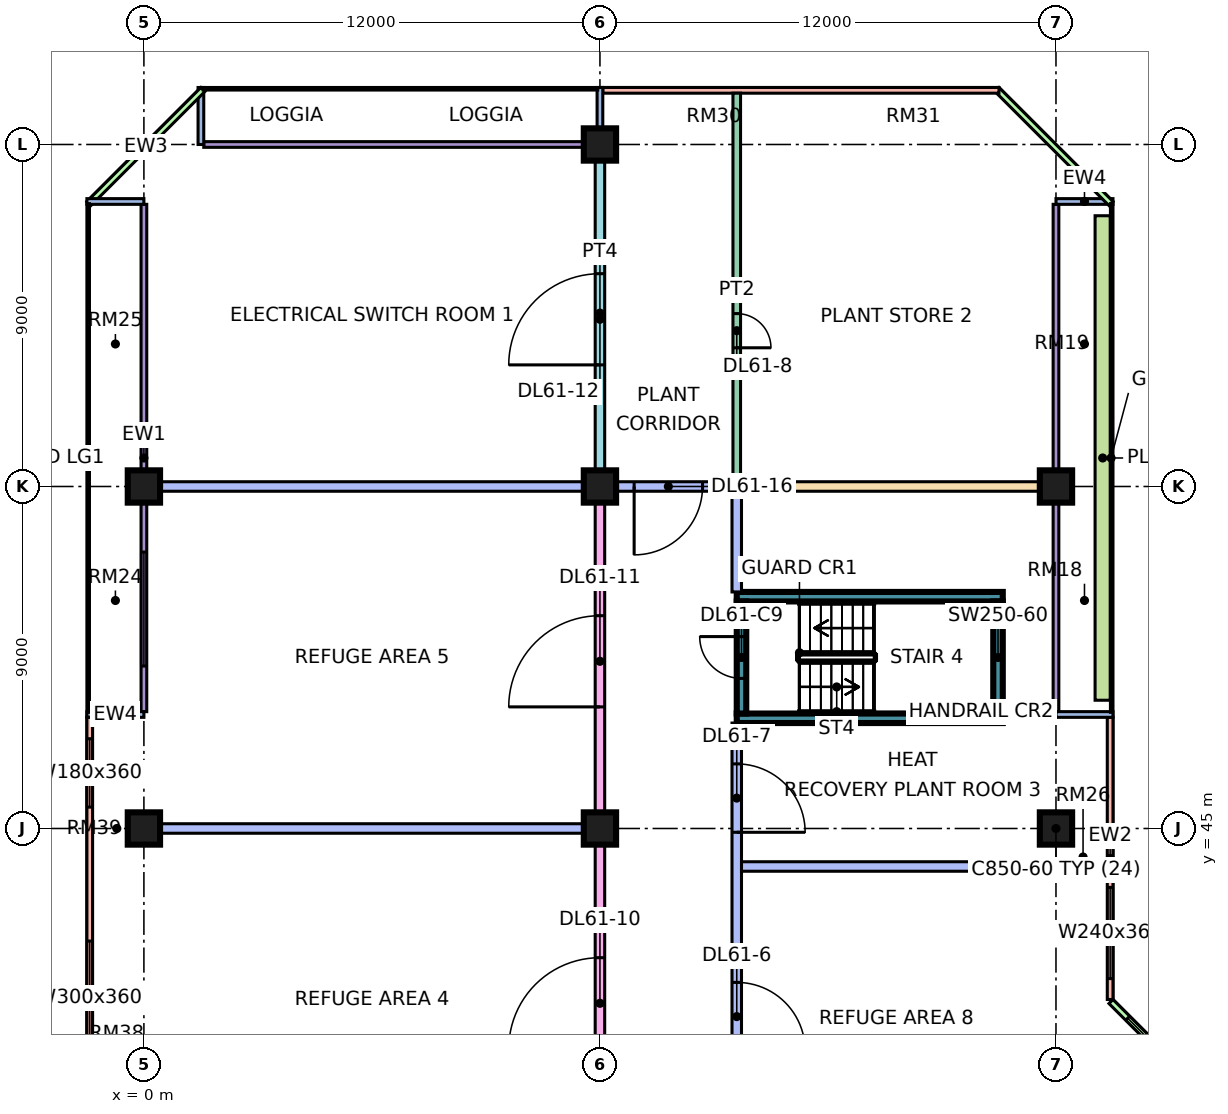
"""IFC4 building model, lengths in metres.
Left out: names, types, materials, properties, quantities, classifications, styles, units other than length and angle.
Written with IfcOpenShell. Run it as: python <this file> out.ifc"""

import sys

from ifc_helpers import new_model, si_unit, direction, frame, frame_2d, origin, origin_2d, place, context, subcontext, project, spatial, rectangle, extrude, element, fill, save


model = new_model("IFC4")
c1 = context("Model", 3, precision=1e-05, world=origin(), true_north=direction((0.0, 1.0)))
c2 = subcontext(c1, "Body", "Model", "MODEL_VIEW")
j1 = project(units=[si_unit("LENGTHUNIT", "METRE"), si_unit("PLANEANGLEUNIT", "RADIAN")], contexts=[c1])
p1 = place(None, origin())
s1 = spatial("IfcSite", under=j1, at=p1, CompositionType="ELEMENT")
p2 = place(p1, origin())
s2 = spatial("IfcBuilding", under=s1, at=p2, CompositionType="ELEMENT")
p3 = place(p2, frame((0.0, 0.0, 256.65)))
s3 = spatial("IfcBuildingStorey", under=s2, at=p3, CompositionType="ELEMENT", Elevation=256.65)
p4 = place(p3, frame((0.0, 45.0, 0.0), z_axis=(0.0, 0.0, 1.0), x_axis=(1.0, 0.0, 0.0)))
e1 = element("IfcColumn", 1, at=p4, inside=s3, PredefinedType="COLUMN", context=c2, shape_type="SweptSolid", body=[
    extrude(rectangle(XDim=0.85, YDim=0.85, at=origin_2d()), origin(), (0.0, 0.0, 1.0), 5.5),
])
for number, where, z_axis, x_axis in (
    (2, (0.0, 54.0, 0.0), (0.0, 0.0, 1.0), (1.0, 0.0, 0.0)),
    (3, (12.0, 45.0, 0.0), (0.0, 0.0, 1.0), (1.0, 0.0, 0.0)),
    (4, (12.0, 54.0, 0.0), (0.0, 0.0, 1.0), (1.0, 0.0, 0.0)),
    (5, (12.0, 63.0, 0.0), (0.0, 0.0, 1.0), (1.0, 0.0, 0.0)),
    (6, (24.0, 45.0, 0.0), (0.0, 0.0, 1.0), (1.0, 0.0, 0.0)),
    (7, (24.0, 54.0, 0.0), (0.0, 0.0, 1.0), (1.0, 0.0, 0.0)),
):
    element("IfcColumn", number, at=place(p3, frame(where, z_axis=z_axis, x_axis=x_axis)), inside=s3, PredefinedType="COLUMN", context=c2, shape_type="SweptSolid", body=[
        extrude(rectangle(XDim=0.85, YDim=0.85, at=origin_2d()), origin(), (0.0, 0.0, 1.0), 5.5),
    ])
for number, where, z_axis, x_axis in (
    (8, (15.6, 47.9, 0.0), (0.0, 0.0, 1.0), (1.0, 0.0, 0.0)),
    (9, (15.6, 51.1, 0.0), (0.0, 0.0, 1.0), (1.0, 0.0, 0.0)),
):
    element("IfcWall", number, at=place(p3, frame(where, z_axis=z_axis, x_axis=x_axis)), inside=s3, PredefinedType="SHEAR", context=c2, shape_type="SweptSolid", body=[
        extrude(rectangle(XDim=7.0, YDim=0.25, at=frame_2d((3.5, 0.0))), origin(), (0.0, 0.0, 1.0), 5.5),
    ])
p5 = place(p3, frame((15.725, 48.025, 0.0), z_axis=(0.0, 0.0, 1.0), x_axis=(0.0, 1.0, 0.0)))
e10 = element("IfcWall", 10, at=p5, inside=s3, PredefinedType="SHEAR", context=c2, shape_type="SweptSolid", body=[
    extrude(rectangle(XDim=2.95, YDim=0.25, at=frame_2d((1.475, 0.0))), origin(), (0.0, 0.0, 1.0), 5.5),
])
p6 = place(p5, frame((0.925, 0.0, 0.0)))
e11 = element("IfcOpeningElement", 11, at=p6, cuts=e10, PredefinedType="OPENING", context=c2, shape_type="SweptSolid", body=[
    extrude(rectangle(XDim=1.1, YDim=2.2, at=frame_2d((0.55, 1.1))), frame((0.0, 0.135, 0.0), z_axis=(0.0, -1.0, 0.0), x_axis=(1.0, 0.0, 0.0)), (0.0, 0.0, 1.0), 0.27),
])
p7 = place(p3, frame((22.475, 48.025, 0.0), z_axis=(0.0, 0.0, 1.0), x_axis=(0.0, 1.0, 0.0)))
e12 = element("IfcWall", 12, at=p7, inside=s3, PredefinedType="SHEAR", context=c2, shape_type="SweptSolid", body=[
    extrude(rectangle(XDim=2.95, YDim=0.25, at=frame_2d((1.475, 0.0))), origin(), (0.0, 0.0, 1.0), 5.5),
])
p8 = place(p3, frame((28.447, 37.447, 0.0), z_axis=(0.0, 0.0, 1.0), x_axis=(-0.707106781187, 0.707106781187, 0.0)))
e13 = element("IfcWall", 13, at=p8, inside=s3, PredefinedType="SOLIDWALL", context=c2, shape_type="SweptSolid", body=[
    extrude(rectangle(XDim=4.243, YDim=0.15, at=frame_2d((2.121, 0.0))), origin(), (0.0, 0.0, 1.0), 5.05),
])
p9 = place(p8, frame((0.621, 0.0, 0.45)))
e14 = element("IfcOpeningElement", 14, at=p9, cuts=e13, PredefinedType="OPENING", context=c2, shape_type="SweptSolid", body=[
    extrude(rectangle(XDim=3.0, YDim=3.6, at=frame_2d((1.5, 1.8))), frame((0.0, 0.085, 0.0), z_axis=(0.0, -1.0, 0.0), x_axis=(1.0, 0.0, 0.0)), (0.0, 0.0, 1.0), 0.17),
])
p10 = place(p3, frame((25.425, 40.5, 0.0), z_axis=(0.0, 0.0, 1.0), x_axis=(0.0, 1.0, 0.0)))
e15 = element("IfcWall", 15, at=p10, inside=s3, PredefinedType="SOLIDWALL", context=c2, shape_type="SweptSolid", body=[
    extrude(rectangle(XDim=7.425, YDim=0.15, at=frame_2d((3.712, 0.0))), origin(), (0.0, 0.0, 1.0), 5.05),
])
p11 = place(p10, frame((0.55, 0.0, 0.45)))
e16 = element("IfcOpeningElement", 16, at=p11, cuts=e15, PredefinedType="OPENING", context=c2, shape_type="SweptSolid", body=[
    extrude(rectangle(XDim=2.4, YDim=3.6, at=frame_2d((1.2, 1.8))), frame((0.0, 0.085, 0.0), z_axis=(0.0, -1.0, 0.0), x_axis=(1.0, 0.0, 0.0)), (0.0, 0.0, 1.0), 0.17),
])
p12 = place(p3, frame((24.0, 48.075, 0.0), z_axis=(0.0, 0.0, 1.0), x_axis=(0.0, 1.0, 0.0)))
e17 = element("IfcWall", 17, at=p12, inside=s3, PredefinedType="SOLIDWALL", context=c2, shape_type="SweptSolid", body=[
    extrude(rectangle(XDim=13.35, YDim=0.15, at=frame_2d((6.675, 0.0))), origin(), (0.0, 0.0, 1.0), 5.05),
])
for number, where, z_axis, x_axis in (
    (18, (25.5, 48.0, 0.0), (0.0, 0.0, 1.0), (-1.0, 0.0, 0.0)),
    (19, (25.5, 61.5, 0.0), (0.0, 0.0, 1.0), (-1.0, 0.0, 0.0)),
):
    element("IfcWall", number, at=place(p3, frame(where, z_axis=z_axis, x_axis=x_axis)), inside=s3, PredefinedType="SOLIDWALL", context=c2, shape_type="SweptSolid", body=[
        extrude(rectangle(XDim=1.5, YDim=0.15, at=frame_2d((0.75, 0.0))), origin(), (0.0, 0.0, 1.0), 5.05),
    ])
p13 = place(p3, frame((25.447, 61.447, 0.0), z_axis=(0.0, 0.0, 1.0), x_axis=(-0.707106781187, 0.707106781187, 0.0)))
e20 = element("IfcWall", 20, at=p13, inside=s3, PredefinedType="SOLIDWALL", context=c2, shape_type="SweptSolid", body=[
    extrude(rectangle(XDim=4.243, YDim=0.15, at=frame_2d((2.121, 0.0))), origin(), (0.0, 0.0, 1.0), 5.05),
])
p14 = place(p3, frame((22.5, 64.425, 0.0), z_axis=(0.0, 0.0, 1.0), x_axis=(-1.0, 0.0, 0.0)))
e21 = element("IfcWall", 21, at=p14, inside=s3, PredefinedType="SOLIDWALL", context=c2, shape_type="SweptSolid", body=[
    extrude(rectangle(XDim=10.425, YDim=0.15, at=frame_2d((5.212, 0.0))), origin(), (0.0, 0.0, 1.0), 5.05),
])
p15 = place(p3, frame((11.925, 63.0, 0.0), z_axis=(0.0, 0.0, 1.0), x_axis=(-1.0, 0.0, 0.0)))
e22 = element("IfcWall", 22, at=p15, inside=s3, PredefinedType="SOLIDWALL", context=c2, shape_type="SweptSolid", body=[
    extrude(rectangle(XDim=10.35, YDim=0.15, at=frame_2d((5.175, 0.0))), origin(), (0.0, 0.0, 1.0), 5.05),
])
for number, where, z_axis, x_axis in (
    (23, (12.0, 64.5, 0.0), (0.0, 0.0, 1.0), (0.0, -1.0, 0.0)),
    (24, (1.5, 64.5, 0.0), (0.0, 0.0, 1.0), (0.0, -1.0, 0.0)),
):
    element("IfcWall", number, at=place(p3, frame(where, z_axis=z_axis, x_axis=x_axis)), inside=s3, PredefinedType="SOLIDWALL", context=c2, shape_type="SweptSolid", body=[
        extrude(rectangle(XDim=1.5, YDim=0.15, at=frame_2d((0.75, 0.0))), origin(), (0.0, 0.0, 1.0), 5.05),
    ])
p16 = place(p3, frame((1.553, 64.447, 0.0), z_axis=(0.0, 0.0, 1.0), x_axis=(-0.707106781187, -0.707106781187, 0.0)))
e25 = element("IfcWall", 25, at=p16, inside=s3, PredefinedType="SOLIDWALL", context=c2, shape_type="SweptSolid", body=[
    extrude(rectangle(XDim=4.243, YDim=0.15, at=frame_2d((2.121, 0.0))), origin(), (0.0, 0.0, 1.0), 5.05),
])
p17 = place(p3, frame((0.0, 61.425, 0.0), z_axis=(0.0, 0.0, 1.0), x_axis=(0.0, -1.0, 0.0)))
e26 = element("IfcWall", 26, at=p17, inside=s3, PredefinedType="SOLIDWALL", context=c2, shape_type="SweptSolid", body=[
    extrude(rectangle(XDim=13.35, YDim=0.15, at=frame_2d((6.675, 0.0))), origin(), (0.0, 0.0, 1.0), 5.05),
])
p18 = place(p17, frame((9.15, 0.0, 0.45)))
e27 = element("IfcOpeningElement", 27, at=p18, cuts=e26, PredefinedType="OPENING", context=c2, shape_type="SweptSolid", body=[
    extrude(rectangle(XDim=3.0, YDim=3.6, at=frame_2d((1.5, 1.8))), frame((0.0, 0.085, 0.0), z_axis=(0.0, -1.0, 0.0), x_axis=(1.0, 0.0, 0.0)), (0.0, 0.0, 1.0), 0.17),
])
for number, where, z_axis, x_axis in (
    (28, (-1.5, 61.5, 0.0), (0.0, 0.0, 1.0), (1.0, 0.0, 0.0)),
    (29, (-1.5, 48.0, 0.0), (0.0, 0.0, 1.0), (1.0, 0.0, 0.0)),
):
    element("IfcWall", number, at=place(p3, frame(where, z_axis=z_axis, x_axis=x_axis)), inside=s3, PredefinedType="SOLIDWALL", context=c2, shape_type="SweptSolid", body=[
        extrude(rectangle(XDim=1.5, YDim=0.15, at=frame_2d((0.75, 0.0))), origin(), (0.0, 0.0, 1.0), 5.05),
    ])
p19 = place(p3, frame((-1.425, 47.925, 0.0), z_axis=(0.0, 0.0, 1.0), x_axis=(0.0, -1.0, 0.0)))
e30 = element("IfcWall", 30, at=p19, inside=s3, PredefinedType="SOLIDWALL", context=c2, shape_type="SweptSolid", body=[
    extrude(rectangle(XDim=11.85, YDim=0.15, at=frame_2d((5.925, 0.0))), origin(), (0.0, 0.0, 1.0), 5.05),
])
p20 = place(p19, frame((0.562, 0.0, 0.45)))
e31 = element("IfcOpeningElement", 31, at=p20, cuts=e30, PredefinedType="OPENING", context=c2, shape_type="SweptSolid", body=[
    extrude(rectangle(XDim=1.8, YDim=3.6, at=frame_2d((0.9, 1.8))), frame((0.0, 0.085, 0.0), z_axis=(0.0, -1.0, 0.0), x_axis=(1.0, 0.0, 0.0)), (0.0, 0.0, 1.0), 0.17),
])
p21 = place(p19, frame((5.887, 0.0, 0.45)))
e32 = element("IfcOpeningElement", 32, at=p21, cuts=e30, PredefinedType="OPENING", context=c2, shape_type="SweptSolid", body=[
    extrude(rectangle(XDim=3.0, YDim=3.6, at=frame_2d((1.5, 1.8))), frame((0.0, 0.085, 0.0), z_axis=(0.0, -1.0, 0.0), x_axis=(1.0, 0.0, 0.0)), (0.0, 0.0, 1.0), 0.17),
])
p22 = place(p3, frame((25.229, 48.375, 0.0), z_axis=(0.0, 0.0, 1.0), x_axis=(0.0, 1.0, 0.0)))
e33 = element("IfcWall", 33, at=p22, inside=s3, PredefinedType="SOLIDWALL", context=c2, shape_type="SweptSolid", body=[
    extrude(rectangle(XDim=12.75, YDim=0.4, at=frame_2d((6.375, 0.0))), origin(), (0.0, 0.0, 1.0), 0.7),
])
e34 = element("IfcWall", 34, at=p4, inside=s3, PredefinedType="PARTITIONING", context=c2, shape_type="SweptSolid", body=[
    extrude(rectangle(XDim=11.875, YDim=0.25, at=frame_2d((5.938, 0.0))), origin(), (0.0, 0.0, 1.0), 5.05),
])
p23 = place(p3, frame((0.074, 54.0, 0.0), z_axis=(0.0, 0.0, 1.0), x_axis=(1.0, 0.0, 0.0)))
e35 = element("IfcWall", 35, at=p23, inside=s3, PredefinedType="PARTITIONING", context=c2, shape_type="SweptSolid", body=[
    extrude(rectangle(XDim=15.526, YDim=0.25, at=frame_2d((7.763, 0.0))), origin(), (0.0, 0.0, 1.0), 5.05),
])
p24 = place(p23, frame((12.826, 0.0, 0.0)))
e36 = element("IfcOpeningElement", 36, at=p24, cuts=e35, PredefinedType="OPENING", context=c2, shape_type="SweptSolid", body=[
    extrude(rectangle(XDim=1.8, YDim=2.1, at=frame_2d((0.9, 1.05))), frame((0.0, 0.135, 0.0), z_axis=(0.0, -1.0, 0.0), x_axis=(1.0, 0.0, 0.0)), (0.0, 0.0, 1.0), 0.27),
])
p25 = place(p3, frame((12.0, 22.875, 0.0), z_axis=(0.0, 0.0, 1.0), x_axis=(0.0, 1.0, 0.0)))
e37 = element("IfcWall", 37, at=p25, inside=s3, PredefinedType="PARTITIONING", context=c2, shape_type="SweptSolid", body=[
    extrude(rectangle(XDim=31.0, YDim=0.25, at=frame_2d((15.5, 0.0))), origin(), (0.0, 0.0, 1.0), 2.45),
])
p26 = place(p25, frame((5.825, 0.0, 0.0)))
e38 = element("IfcOpeningElement", 38, at=p26, cuts=e37, PredefinedType="OPENING", context=c2, shape_type="SweptSolid", body=[
    extrude(rectangle(XDim=2.4, YDim=2.1, at=frame_2d((1.2, 1.05))), frame((0.0, 0.135, 0.0), z_axis=(0.0, -1.0, 0.0), x_axis=(1.0, 0.0, 0.0)), (0.0, 0.0, 1.0), 0.27),
])
p27 = place(p25, frame((16.325, 0.0, 0.0)))
e39 = element("IfcOpeningElement", 39, at=p27, cuts=e37, PredefinedType="OPENING", context=c2, shape_type="SweptSolid", body=[
    extrude(rectangle(XDim=2.4, YDim=2.1, at=frame_2d((1.2, 1.05))), frame((0.0, 0.135, 0.0), z_axis=(0.0, -1.0, 0.0), x_axis=(1.0, 0.0, 0.0)), (0.0, 0.0, 1.0), 0.27),
])
p28 = place(p25, frame((25.325, 0.0, 0.0)))
e40 = element("IfcOpeningElement", 40, at=p28, cuts=e37, PredefinedType="OPENING", context=c2, shape_type="SweptSolid", body=[
    extrude(rectangle(XDim=2.4, YDim=2.1, at=frame_2d((1.2, 1.05))), frame((0.0, 0.135, 0.0), z_axis=(0.0, -1.0, 0.0), x_axis=(1.0, 0.0, 0.0)), (0.0, 0.0, 1.0), 0.27),
])
p29 = place(p3, frame((12.0, 54.125, 0.0), z_axis=(0.0, 0.0, 1.0), x_axis=(0.0, 1.0, 0.0)))
e41 = element("IfcWall", 41, at=p29, inside=s3, PredefinedType="PARTITIONING", context=c2, shape_type="SweptSolid", body=[
    extrude(rectangle(XDim=8.875, YDim=0.25, at=frame_2d((4.438, 0.0))), origin(), (0.0, 0.0, 1.0), 2.45),
])
p30 = place(p29, frame((3.075, 0.0, 0.0)))
e42 = element("IfcOpeningElement", 42, at=p30, cuts=e41, PredefinedType="OPENING", context=c2, shape_type="SweptSolid", body=[
    extrude(rectangle(XDim=2.4, YDim=2.1, at=frame_2d((1.2, 1.05))), frame((0.0, 0.135, 0.0), z_axis=(0.0, -1.0, 0.0), x_axis=(1.0, 0.0, 0.0)), (0.0, 0.0, 1.0), 0.27),
])
p31 = place(p3, frame((15.6, 20.0, 0.0), z_axis=(0.0, 0.0, 1.0), x_axis=(0.0, 1.0, 0.0)))
e43 = element("IfcWall", 43, at=p31, inside=s3, PredefinedType="PARTITIONING", context=c2, shape_type="SweptSolid", body=[
    extrude(rectangle(XDim=27.775, YDim=0.25, at=frame_2d((13.887, 0.0))), origin(), (0.0, 0.0, 1.0), 5.05),
])
p32 = place(p31, frame((19.15, 0.0, 0.0)))
e44 = element("IfcOpeningElement", 44, at=p32, cuts=e43, PredefinedType="OPENING", context=c2, shape_type="SweptSolid", body=[
    extrude(rectangle(XDim=1.8, YDim=2.1, at=frame_2d((0.9, 1.05))), frame((0.0, 0.135, 0.0), z_axis=(0.0, -1.0, 0.0), x_axis=(1.0, 0.0, 0.0)), (0.0, 0.0, 1.0), 0.27),
])
p33 = place(p31, frame((24.9, 0.0, 0.0)))
e45 = element("IfcOpeningElement", 45, at=p33, cuts=e43, PredefinedType="OPENING", context=c2, shape_type="SweptSolid", body=[
    extrude(rectangle(XDim=1.8, YDim=2.1, at=frame_2d((0.9, 1.05))), frame((0.0, 0.135, 0.0), z_axis=(0.0, -1.0, 0.0), x_axis=(1.0, 0.0, 0.0)), (0.0, 0.0, 1.0), 0.27),
])
p34 = place(p31, frame((14.65, 0.0, 0.0)))
e46 = element("IfcOpeningElement", 46, at=p34, cuts=e43, PredefinedType="OPENING", context=c2, shape_type="SweptSolid", body=[
    extrude(rectangle(XDim=0.9, YDim=2.1, at=frame_2d((0.45, 1.05))), frame((0.0, 0.135, 0.0), z_axis=(0.0, -1.0, 0.0), x_axis=(1.0, 0.0, 0.0)), (0.0, 0.0, 1.0), 0.27),
])
p35 = place(p31, frame((11.4, 0.0, 0.0)))
e47 = element("IfcOpeningElement", 47, at=p35, cuts=e43, PredefinedType="OPENING", context=c2, shape_type="SweptSolid", body=[
    extrude(rectangle(XDim=0.9, YDim=2.1, at=frame_2d((0.45, 1.05))), frame((0.0, 0.135, 0.0), z_axis=(0.0, -1.0, 0.0), x_axis=(1.0, 0.0, 0.0)), (0.0, 0.0, 1.0), 0.27),
])
p36 = place(p3, frame((15.6, 51.225, 0.0), z_axis=(0.0, 0.0, 1.0), x_axis=(0.0, 1.0, 0.0)))
e48 = element("IfcWall", 48, at=p36, inside=s3, PredefinedType="PARTITIONING", context=c2, shape_type="SweptSolid", body=[
    extrude(rectangle(XDim=2.775, YDim=0.25, at=frame_2d((1.387, 0.0))), origin(), (0.0, 0.0, 1.0), 5.05),
])
p37 = place(p3, frame((15.6, 54.0, 0.0), z_axis=(0.0, 0.0, 1.0), x_axis=(0.0, 1.0, 0.0)))
e49 = element("IfcWall", 49, at=p37, inside=s3, PredefinedType="PARTITIONING", context=c2, shape_type="SweptSolid", body=[
    extrude(rectangle(XDim=10.35, YDim=0.2, at=frame_2d((5.175, 0.0))), origin(), (0.0, 0.0, 1.0), 5.05),
])
p38 = place(p37, frame((3.65, 0.0, 0.0)))
e50 = element("IfcOpeningElement", 50, at=p38, cuts=e49, PredefinedType="OPENING", context=c2, shape_type="SweptSolid", body=[
    extrude(rectangle(XDim=0.9, YDim=2.1, at=frame_2d((0.45, 1.05))), frame((0.0, 0.11, 0.0), z_axis=(0.0, -1.0, 0.0), x_axis=(1.0, 0.0, 0.0)), (0.0, 0.0, 1.0), 0.22),
])
p39 = place(p3, frame((15.6, 54.0, 0.0), z_axis=(0.0, 0.0, 1.0), x_axis=(1.0, 0.0, 0.0)))
e51 = element("IfcWall", 51, at=p39, inside=s3, PredefinedType="PARTITIONING", context=c2, shape_type="SweptSolid", body=[
    extrude(rectangle(XDim=8.326, YDim=0.25, at=frame_2d((4.163, 0.0))), origin(), (0.0, 0.0, 1.0), 5.05),
])
p40 = place(p3, frame((15.725, 44.0, 0.0), z_axis=(0.0, 0.0, 1.0), x_axis=(1.0, 0.0, 0.0)))
e52 = element("IfcWall", 52, at=p40, inside=s3, PredefinedType="PARTITIONING", context=c2, shape_type="SweptSolid", body=[
    extrude(rectangle(XDim=9.625, YDim=0.25, at=frame_2d((4.812, 0.0))), origin(), (0.0, 0.0, 1.0), 5.05),
])
p41 = place(p9, origin())
e53 = element("IfcWindow", 53, at=p41, inside=s3, PartitioningType="SINGLE_PANEL", PredefinedType="WINDOW", context=c2, shape_type="SweptSolid", body=[
    extrude(rectangle(XDim=3.0, YDim=3.6, at=frame_2d((1.5, 1.8))), frame((0.0, 0.03, 0.0), z_axis=(0.0, -1.0, 0.0), x_axis=(1.0, 0.0, 0.0)), (0.0, 0.0, 1.0), 0.06),
])
fill(e14, e53)
p42 = place(p11, origin())
e54 = element("IfcWindow", 54, at=p42, inside=s3, PartitioningType="SINGLE_PANEL", PredefinedType="WINDOW", context=c2, shape_type="SweptSolid", body=[
    extrude(rectangle(XDim=2.4, YDim=3.6, at=frame_2d((1.2, 1.8))), frame((0.0, 0.03, 0.0), z_axis=(0.0, -1.0, 0.0), x_axis=(1.0, 0.0, 0.0)), (0.0, 0.0, 1.0), 0.06),
])
fill(e16, e54)
p43 = place(p18, origin())
e55 = element("IfcWindow", 55, at=p43, inside=s3, PartitioningType="SINGLE_PANEL", PredefinedType="WINDOW", context=c2, shape_type="SweptSolid", body=[
    extrude(rectangle(XDim=3.0, YDim=3.6, at=frame_2d((1.5, 1.8))), frame((0.0, 0.03, 0.0), z_axis=(0.0, -1.0, 0.0), x_axis=(1.0, 0.0, 0.0)), (0.0, 0.0, 1.0), 0.06),
])
fill(e27, e55)
p44 = place(p20, origin())
e56 = element("IfcWindow", 56, at=p44, inside=s3, PartitioningType="SINGLE_PANEL", PredefinedType="WINDOW", context=c2, shape_type="SweptSolid", body=[
    extrude(rectangle(XDim=1.8, YDim=3.6, at=frame_2d((0.9, 1.8))), frame((0.0, 0.03, 0.0), z_axis=(0.0, -1.0, 0.0), x_axis=(1.0, 0.0, 0.0)), (0.0, 0.0, 1.0), 0.06),
])
fill(e31, e56)
p45 = place(p21, origin())
e57 = element("IfcWindow", 57, at=p45, inside=s3, PartitioningType="SINGLE_PANEL", PredefinedType="WINDOW", context=c2, shape_type="SweptSolid", body=[
    extrude(rectangle(XDim=3.0, YDim=3.6, at=frame_2d((1.5, 1.8))), frame((0.0, 0.03, 0.0), z_axis=(0.0, -1.0, 0.0), x_axis=(1.0, 0.0, 0.0)), (0.0, 0.0, 1.0), 0.06),
])
fill(e32, e57)
p46 = place(p6, frame((1.1, 0.0, 0.0), z_axis=(0.0, 0.0, 1.0), x_axis=(-1.0, 0.0, 0.0)))
e58 = element("IfcDoor", 58, at=p46, inside=s3, OperationType="SINGLE_SWING_RIGHT", PredefinedType="DOOR", context=c2, shape_type="SweptSolid", body=[
    extrude(rectangle(XDim=1.1, YDim=2.2, at=frame_2d((0.55, 1.1))), frame((0.0, 0.025, 0.0), z_axis=(0.0, -1.0, 0.0), x_axis=(1.0, 0.0, 0.0)), (0.0, 0.0, 1.0), 0.05),
])
fill(e11, e58)
p47 = place(p32, frame((1.8, 0.0, 0.0), z_axis=(0.0, 0.0, 1.0), x_axis=(-1.0, 0.0, 0.0)))
e59 = element("IfcDoor", 59, at=p47, inside=s3, OperationType="DOUBLE_DOOR_SINGLE_SWING", PredefinedType="DOOR", context=c2, shape_type="SweptSolid", body=[
    extrude(rectangle(XDim=1.8, YDim=2.1, at=frame_2d((0.9, 1.05))), frame((0.0, 0.025, 0.0), z_axis=(0.0, -1.0, 0.0), x_axis=(1.0, 0.0, 0.0)), (0.0, 0.0, 1.0), 0.05),
])
fill(e44, e59)
p48 = place(p33, frame((1.8, 0.0, 0.0), z_axis=(0.0, 0.0, 1.0), x_axis=(-1.0, 0.0, 0.0)))
e60 = element("IfcDoor", 60, at=p48, inside=s3, OperationType="DOUBLE_DOOR_SINGLE_SWING", PredefinedType="DOOR", context=c2, shape_type="SweptSolid", body=[
    extrude(rectangle(XDim=1.8, YDim=2.1, at=frame_2d((0.9, 1.05))), frame((0.0, 0.025, 0.0), z_axis=(0.0, -1.0, 0.0), x_axis=(1.0, 0.0, 0.0)), (0.0, 0.0, 1.0), 0.05),
])
fill(e45, e60)
p49 = place(p38, frame((0.9, 0.0, 0.0), z_axis=(0.0, 0.0, 1.0), x_axis=(-1.0, 0.0, 0.0)))
e61 = element("IfcDoor", 61, at=p49, inside=s3, OperationType="SINGLE_SWING_LEFT", PredefinedType="DOOR", context=c2, shape_type="SweptSolid", body=[
    extrude(rectangle(XDim=0.9, YDim=2.1, at=frame_2d((0.45, 1.05))), frame((0.0, 0.025, 0.0), z_axis=(0.0, -1.0, 0.0), x_axis=(1.0, 0.0, 0.0)), (0.0, 0.0, 1.0), 0.05),
])
fill(e50, e61)
p50 = place(p27, origin())
e62 = element("IfcDoor", 62, at=p50, inside=s3, OperationType="DOUBLE_DOOR_SINGLE_SWING", PredefinedType="DOOR", context=c2, shape_type="SweptSolid", body=[
    extrude(rectangle(XDim=2.4, YDim=2.1, at=frame_2d((1.2, 1.05))), frame((0.0, 0.025, 0.0), z_axis=(0.0, -1.0, 0.0), x_axis=(1.0, 0.0, 0.0)), (0.0, 0.0, 1.0), 0.05),
])
fill(e39, e62)
p51 = place(p28, origin())
e63 = element("IfcDoor", 63, at=p51, inside=s3, OperationType="DOUBLE_DOOR_SINGLE_SWING", PredefinedType="DOOR", context=c2, shape_type="SweptSolid", body=[
    extrude(rectangle(XDim=2.4, YDim=2.1, at=frame_2d((1.2, 1.05))), frame((0.0, 0.025, 0.0), z_axis=(0.0, -1.0, 0.0), x_axis=(1.0, 0.0, 0.0)), (0.0, 0.0, 1.0), 0.05),
])
fill(e40, e63)
p52 = place(p30, origin())
e64 = element("IfcDoor", 64, at=p52, inside=s3, OperationType="DOUBLE_DOOR_SINGLE_SWING", PredefinedType="DOOR", context=c2, shape_type="SweptSolid", body=[
    extrude(rectangle(XDim=2.4, YDim=2.1, at=frame_2d((1.2, 1.05))), frame((0.0, 0.025, 0.0), z_axis=(0.0, -1.0, 0.0), x_axis=(1.0, 0.0, 0.0)), (0.0, 0.0, 1.0), 0.05),
])
fill(e42, e64)
p53 = place(p24, frame((1.8, 0.0, 0.0), z_axis=(0.0, 0.0, 1.0), x_axis=(-1.0, 0.0, 0.0)))
e65 = element("IfcDoor", 65, at=p53, inside=s3, OperationType="DOUBLE_DOOR_SINGLE_SWING", PredefinedType="DOOR", context=c2, shape_type="SweptSolid", body=[
    extrude(rectangle(XDim=1.8, YDim=2.1, at=frame_2d((0.9, 1.05))), frame((0.0, 0.025, 0.0), z_axis=(0.0, -1.0, 0.0), x_axis=(1.0, 0.0, 0.0)), (0.0, 0.0, 1.0), 0.05),
])
fill(e36, e65)
save(model, sys.argv[1])
